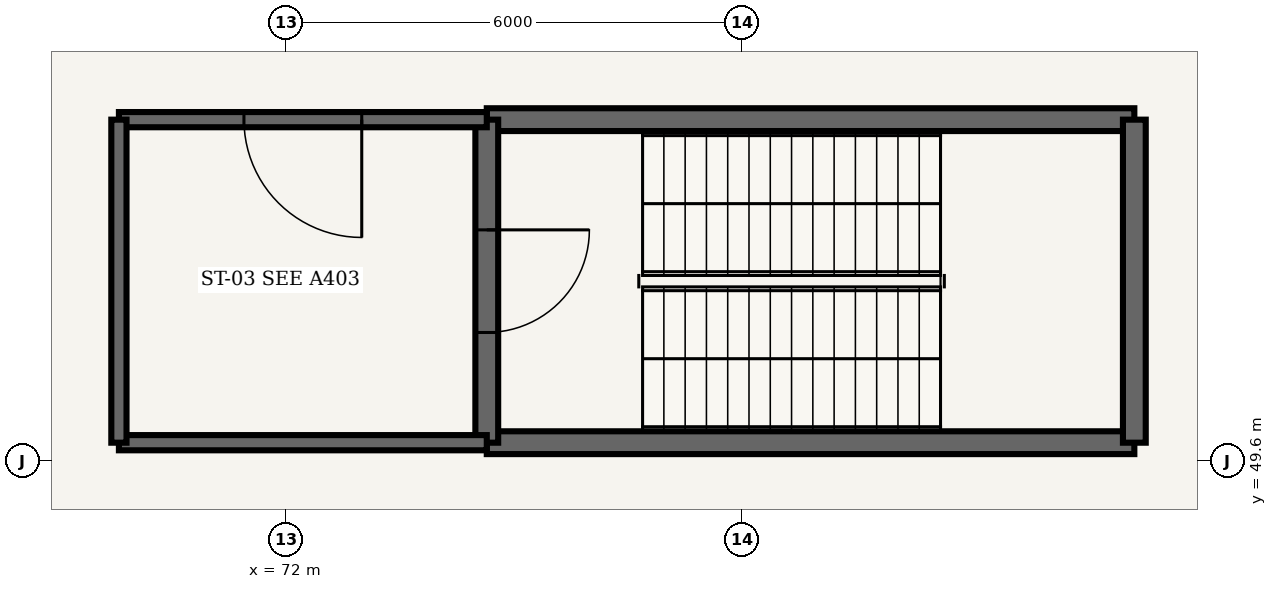
"""IFC4 building model, lengths in metres.
Left out: names, types, materials, properties, quantities, classifications, styles, units other than length and angle.
Written with IfcOpenShell. Run it as: python <this file> out.ifc"""

import sys

from ifc_helpers import new_model, si_unit, direction, frame, frame_2d, origin, place, context, subcontext, project, spatial, rectangle, extrude, element, fill, save


model = new_model("IFC4")
c1 = context("Model", 3, precision=1e-05, world=origin(), true_north=direction((0.0, 1.0)))
c2 = subcontext(c1, "Body", "Model", "MODEL_VIEW")
j1 = project(units=[si_unit("LENGTHUNIT", "METRE"), si_unit("PLANEANGLEUNIT", "RADIAN")], contexts=[c1])
p1 = place(None, origin())
s1 = spatial("IfcSite", under=j1, at=p1, CompositionType="ELEMENT")
p2 = place(p1, origin())
s2 = spatial("IfcBuilding", under=s1, at=p2, CompositionType="ELEMENT")
p3 = place(p2, frame((0.0, 0.0, -5.4)))
s3 = spatial("IfcBuildingStorey", under=s2, at=p3, CompositionType="ELEMENT", Elevation=-5.4)
for number, where, z_axis, x_axis in (
    (1, (74.64, 49.84, -0.4), (0.0, 0.0, 1.0), (1.0, 0.0, 0.0)),
    (2, (83.16, 54.09, -0.4), (0.0, 0.0, 1.0), (-1.0, 0.0, 0.0)),
):
    element("IfcWall", number, at=place(p3, frame(where, z_axis=z_axis, x_axis=x_axis)), inside=s3, PredefinedType="SHEAR", context=c2, shape_type="SweptSolid", body=[
        extrude(rectangle(XDim=8.52, YDim=0.3, at=frame_2d((4.26, 0.0))), origin(), (0.0, 0.0, 1.0), 5.5),
    ])
p4 = place(p3, frame((74.64, 54.09, -0.4), z_axis=(0.0, 0.0, 1.0), x_axis=(0.0, -1.0, 0.0)))
e3 = element("IfcWall", 3, at=p4, inside=s3, PredefinedType="SHEAR", context=c2, shape_type="SweptSolid", body=[
    extrude(rectangle(XDim=4.25, YDim=0.3, at=frame_2d((2.125, 0.0))), origin(), (0.0, 0.0, 1.0), 5.5),
])
p5 = place(p4, frame((1.45, 0.0, 0.4)))
e4 = element("IfcOpeningElement", 4, at=p5, cuts=e3, PredefinedType="OPENING", context=c2, shape_type="SweptSolid", body=[
    extrude(rectangle(XDim=1.35, YDim=2.2, at=frame_2d((0.675, 1.1))), frame((0.0, 0.16, 0.0), z_axis=(0.0, -1.0, 0.0), x_axis=(1.0, 0.0, 0.0)), (0.0, 0.0, 1.0), 0.32),
])
p6 = place(p3, frame((83.16, 49.84, -0.4), z_axis=(0.0, 0.0, 1.0), x_axis=(0.0, 1.0, 0.0)))
e5 = element("IfcWall", 5, at=p6, inside=s3, PredefinedType="SHEAR", context=c2, shape_type="SweptSolid", body=[
    extrude(rectangle(XDim=4.25, YDim=0.3, at=frame_2d((2.125, 0.0))), origin(), (0.0, 0.0, 1.0), 5.5),
])
p7 = place(p3, frame((69.8, 49.84, 0.0), z_axis=(0.0, 0.0, 1.0), x_axis=(1.0, 0.0, 0.0)))
e6 = element("IfcWall", 6, at=p7, inside=s3, PredefinedType="SHEAR", context=c2, shape_type="SweptSolid", body=[
    extrude(rectangle(XDim=4.84, YDim=0.2, at=frame_2d((2.42, 0.0))), origin(), (0.0, 0.0, 1.0), 5.1),
])
p8 = place(p3, frame((74.64, 54.09, 0.0), z_axis=(0.0, 0.0, 1.0), x_axis=(-1.0, 0.0, 0.0)))
e7 = element("IfcWall", 7, at=p8, inside=s3, PredefinedType="SHEAR", context=c2, shape_type="SweptSolid", body=[
    extrude(rectangle(XDim=4.84, YDim=0.2, at=frame_2d((2.42, 0.0))), origin(), (0.0, 0.0, 1.0), 5.1),
])
p9 = place(p8, frame((1.645, 0.0, 0.0)))
e8 = element("IfcOpeningElement", 8, at=p9, cuts=e7, PredefinedType="OPENING", context=c2, shape_type="SweptSolid", body=[
    extrude(rectangle(XDim=1.55, YDim=2.2, at=frame_2d((0.775, 1.1))), frame((0.0, 0.11, 0.0), z_axis=(0.0, -1.0, 0.0), x_axis=(1.0, 0.0, 0.0)), (0.0, 0.0, 1.0), 0.22),
])
p10 = place(p3, frame((69.8, 54.09, 0.0), z_axis=(0.0, 0.0, 1.0), x_axis=(0.0, -1.0, 0.0)))
e9 = element("IfcWall", 9, at=p10, inside=s3, PredefinedType="SHEAR", context=c2, shape_type="SweptSolid", body=[
    extrude(rectangle(XDim=4.25, YDim=0.2, at=frame_2d((2.125, 0.0))), origin(), (0.0, 0.0, 1.0), 5.1),
])
p11 = place(p5, origin())
e10 = element("IfcDoor", 10, at=p11, inside=s3, OperationType="SINGLE_SWING_LEFT", PredefinedType="DOOR", context=c2, shape_type="SweptSolid", body=[
    extrude(rectangle(XDim=1.35, YDim=2.2, at=frame_2d((0.675, 1.1))), frame((0.0, 0.025, 0.0), z_axis=(0.0, -1.0, 0.0), x_axis=(1.0, 0.0, 0.0)), (0.0, 0.0, 1.0), 0.05),
])
fill(e4, e10)
p12 = place(p9, origin())
e11 = element("IfcDoor", 11, at=p12, inside=s3, OperationType="SINGLE_SWING_LEFT", PredefinedType="DOOR", context=c2, shape_type="SweptSolid", body=[
    extrude(rectangle(XDim=1.55, YDim=2.2, at=frame_2d((0.775, 1.1))), frame((0.0, 0.025, 0.0), z_axis=(0.0, -1.0, 0.0), x_axis=(1.0, 0.0, 0.0)), (0.0, 0.0, 1.0), 0.05),
])
fill(e8, e11)
save(model, sys.argv[1])
